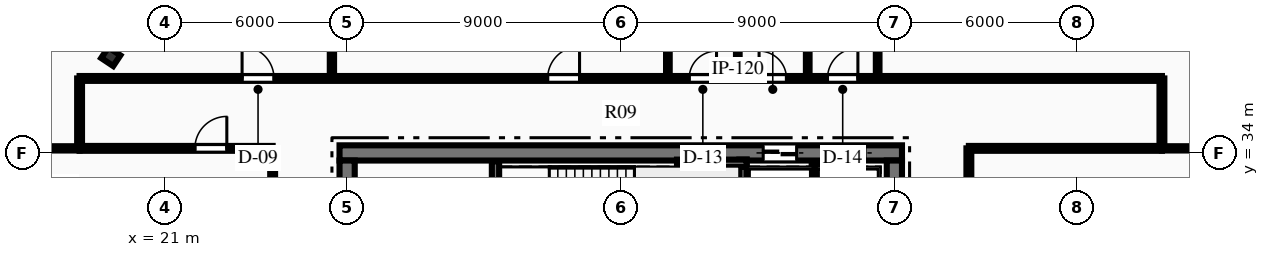
"""IFC4 building model, lengths in metres.
Left out: names, types, materials, properties, quantities, classifications, styles, units other than length and angle.
Written with IfcOpenShell. Run it as: python <this file> out.ifc"""

import sys

from ifc_helpers import new_model, si_unit, direction, frame, frame_2d, origin, origin_2d, place, context, subcontext, project, spatial, rectangle, i_section, extrude, element, fill, save


model = new_model("IFC4")
c1 = context("Model", 3, precision=1e-05, world=origin(), true_north=direction((0.0, 1.0)))
c2 = subcontext(c1, "Body", "Model", "MODEL_VIEW")
j1 = project(units=[si_unit("LENGTHUNIT", "METRE"), si_unit("PLANEANGLEUNIT", "RADIAN")], contexts=[c1])
p1 = place(None, origin())
s1 = spatial("IfcSite", under=j1, at=p1, CompositionType="ELEMENT")
p2 = place(p1, origin())
s2 = spatial("IfcBuilding", under=s1, at=p2, CompositionType="ELEMENT")
p3 = place(p2, frame((0.0, 0.0, 220.95)))
s3 = spatial("IfcBuildingStorey", under=s2, at=p3, CompositionType="ELEMENT", Elevation=220.95)
p4 = place(p3, frame((26.75, 34.0, 0.0), z_axis=(0.0, 0.0, 1.0), x_axis=(1.0, 0.0, 0.0)))
e1 = element("IfcWall", 1, at=p4, inside=s3, PredefinedType="SHEAR", context=c2, shape_type="SweptSolid", body=[
    extrude(rectangle(XDim=18.5, YDim=0.5, at=frame_2d((9.25, 0.0))), origin(), (0.0, 0.0, 1.0), 3.75),
])
p5 = place(p4, frame((13.935, 0.0, 0.0)))
e2 = element("IfcOpeningElement", 2, at=p5, cuts=e1, PredefinedType="OPENING", context=c2, shape_type="SweptSolid", body=[
    extrude(rectangle(XDim=1.1, YDim=2.15, at=frame_2d((0.55, 1.075))), frame((0.0, 0.26, 0.0), z_axis=(0.0, -1.0, 0.0), x_axis=(1.0, 0.0, 0.0)), (0.0, 0.0, 1.0), 0.52),
])
p6 = place(p4, frame((16.185, 0.0, 0.0)))
e3 = element("IfcOpeningElement", 3, at=p6, cuts=e1, PredefinedType="OPENING", context=c2, shape_type="SweptSolid", body=[
    extrude(rectangle(XDim=1.1, YDim=2.15, at=frame_2d((0.55, 1.075))), frame((0.0, 0.26, 0.0), z_axis=(0.0, -1.0, 0.0), x_axis=(1.0, 0.0, 0.0)), (0.0, 0.0, 1.0), 0.52),
])
p7 = place(p3, frame((27.0, 18.25, 0.0), z_axis=(0.0, 0.0, 1.0), x_axis=(0.0, 1.0, 0.0)))
e4 = element("IfcWall", 4, at=p7, inside=s3, PredefinedType="SHEAR", context=c2, shape_type="SweptSolid", body=[
    extrude(rectangle(XDim=15.5, YDim=0.5, at=frame_2d((7.75, 0.0))), origin(), (0.0, 0.0, 1.0), 3.75),
])
p8 = place(p7, frame((9.99, 0.0, 0.0)))
e5 = element("IfcOpeningElement", 5, at=p8, cuts=e4, PredefinedType="OPENING", context=c2, shape_type="SweptSolid", body=[
    extrude(rectangle(XDim=1.4, YDim=2.2, at=frame_2d((0.7, 1.1))), frame((0.0, 0.26, 0.0), z_axis=(0.0, -1.0, 0.0), x_axis=(1.0, 0.0, 0.0)), (0.0, 0.0, 1.0), 0.52),
])
p9 = place(p3, frame((45.0, 18.25, 0.0), z_axis=(0.0, 0.0, 1.0), x_axis=(0.0, 1.0, 0.0)))
e6 = element("IfcWall", 6, at=p9, inside=s3, PredefinedType="SHEAR", context=c2, shape_type="SweptSolid", body=[
    extrude(rectangle(XDim=15.5, YDim=0.5, at=frame_2d((7.75, 0.0))), origin(), (0.0, 0.0, 1.0), 3.75),
])
p10 = place(p9, frame((9.99, 0.0, 0.0)))
e7 = element("IfcOpeningElement", 7, at=p10, cuts=e6, PredefinedType="OPENING", context=c2, shape_type="SweptSolid", body=[
    extrude(rectangle(XDim=1.4, YDim=2.2, at=frame_2d((0.7, 1.1))), frame((0.0, 0.26, 0.0), z_axis=(0.0, -1.0, 0.0), x_axis=(1.0, 0.0, 0.0)), (0.0, 0.0, 1.0), 0.52),
])
p11 = place(p3, frame((31.88, 29.93, 0.0), z_axis=(0.0, 0.0, 1.0), x_axis=(0.0, 1.0, 0.0)))
e8 = element("IfcWall", 8, at=p11, inside=s3, PredefinedType="SHEAR", context=c2, shape_type="SweptSolid", body=[
    extrude(rectangle(XDim=3.79, YDim=0.24, at=frame_2d((1.895, 0.0))), origin(), (0.0, 0.0, 1.0), 3.75),
])
p12 = place(p3, frame((40.02, 29.93, 0.0), z_axis=(0.0, 0.0, 1.0), x_axis=(0.0, 1.0, 0.0)))
e9 = element("IfcWall", 9, at=p12, inside=s3, PredefinedType="SHEAR", context=c2, shape_type="SweptSolid", body=[
    extrude(rectangle(XDim=3.85, YDim=0.24, at=frame_2d((1.925, 0.0))), origin(), (0.0, 0.0, 1.0), 3.75),
])
p13 = place(p3, frame((37.85, 33.66, 0.0), z_axis=(0.0, 0.0, 1.0), x_axis=(1.0, 0.0, 0.0)))
e10 = element("IfcWall", 10, at=p13, inside=s3, PredefinedType="SHEAR", context=c2, shape_type="SweptSolid", body=[
    extrude(rectangle(XDim=2.29, YDim=0.24, at=frame_2d((1.145, 0.0))), origin(), (0.0, 0.0, 1.0), 3.75),
])
p14 = place(p3, frame((19.226, 37.166, 0.0), z_axis=(0.0, 0.0, 1.0), x_axis=(0.554118199338, 0.832437998389, 0.0)))
e11 = element("IfcColumn", 11, at=p14, inside=s3, PredefinedType="COLUMN", context=c2, shape_type="SweptSolid", body=[
    extrude(i_section(OverallWidth=0.424, OverallDepth=0.474, WebThickness=0.048, FlangeThickness=0.077, at=origin_2d()), origin(), (0.0, 0.0, 1.0), 3.75),
])
p15 = place(p3, frame((42.37, 29.9, 0.0), z_axis=(0.0, 0.0, 1.0), x_axis=(0.0, 1.0, 0.0)))
e12 = element("IfcWall", 12, at=p15, inside=s3, PredefinedType="PARTITIONING", context=c2, shape_type="SweptSolid", body=[
    extrude(rectangle(XDim=3.75, YDim=0.18, at=frame_2d((1.875, 0.0))), origin(), (0.0, 0.0, 1.0), 3.47),
])
p16 = place(p3, frame((18.2, 36.45, 0.0), z_axis=(0.0, 0.0, 1.0), x_axis=(1.0, 0.0, 0.0)))
e13 = element("IfcWall", 13, at=p16, inside=s3, PredefinedType="PARTITIONING", context=c2, shape_type="SweptSolid", body=[
    extrude(rectangle(XDim=35.6, YDim=0.16, at=frame_2d((17.8, 0.0))), origin(), (0.0, 0.0, 1.0), 2.849),
])
p17 = place(p16, frame((20.05, 0.0, 0.0)))
e14 = element("IfcOpeningElement", 14, at=p17, cuts=e13, PredefinedType="OPENING", context=c2, shape_type="SweptSolid", body=[
    extrude(rectangle(XDim=0.9, YDim=2.15, at=frame_2d((0.45, 1.075))), frame((0.0, 0.09, 0.0), z_axis=(0.0, -1.0, 0.0), x_axis=(1.0, 0.0, 0.0)), (0.0, 0.0, 1.0), 0.18),
])
p18 = place(p16, frame((22.35, 0.0, 0.0)))
e15 = element("IfcOpeningElement", 15, at=p18, cuts=e13, PredefinedType="OPENING", context=c2, shape_type="SweptSolid", body=[
    extrude(rectangle(XDim=0.9, YDim=2.15, at=frame_2d((0.45, 1.075))), frame((0.0, 0.09, 0.0), z_axis=(0.0, -1.0, 0.0), x_axis=(1.0, 0.0, 0.0)), (0.0, 0.0, 1.0), 0.18),
])
p19 = place(p16, frame((24.6, 0.0, 0.0)))
e16 = element("IfcOpeningElement", 16, at=p19, cuts=e13, PredefinedType="OPENING", context=c2, shape_type="SweptSolid", body=[
    extrude(rectangle(XDim=1.0, YDim=2.15, at=frame_2d((0.5, 1.075))), frame((0.0, 0.09, 0.0), z_axis=(0.0, -1.0, 0.0), x_axis=(1.0, 0.0, 0.0)), (0.0, 0.0, 1.0), 0.18),
])
p20 = place(p16, frame((5.345, 0.0, 0.0)))
e17 = element("IfcOpeningElement", 17, at=p20, cuts=e13, PredefinedType="OPENING", context=c2, shape_type="SweptSolid", body=[
    extrude(rectangle(XDim=1.05, YDim=2.15, at=frame_2d((0.525, 1.075))), frame((0.0, 0.09, 0.0), z_axis=(0.0, -1.0, 0.0), x_axis=(1.0, 0.0, 0.0)), (0.0, 0.0, 1.0), 0.18),
])
p21 = place(p16, frame((15.395, 0.0, 0.0)))
e18 = element("IfcOpeningElement", 18, at=p21, cuts=e13, PredefinedType="OPENING", context=c2, shape_type="SweptSolid", body=[
    extrude(rectangle(XDim=1.05, YDim=2.15, at=frame_2d((0.525, 1.075))), frame((0.0, 0.09, 0.0), z_axis=(0.0, -1.0, 0.0), x_axis=(1.0, 0.0, 0.0)), (0.0, 0.0, 1.0), 0.18),
])
p22 = place(p3, frame((18.2, 34.15, 0.0), z_axis=(0.0, 0.0, 1.0), x_axis=(1.0, 0.0, 0.0)))
e19 = element("IfcWall", 19, at=p22, inside=s3, PredefinedType="PARTITIONING", context=c2, shape_type="SweptSolid", body=[
    extrude(rectangle(XDim=6.35, YDim=0.16, at=frame_2d((3.175, 0.0))), origin(), (0.0, 0.0, 1.0), 3.47),
])
p23 = place(p22, frame((3.793, 0.0, 0.0)))
e20 = element("IfcOpeningElement", 20, at=p23, cuts=e19, PredefinedType="OPENING", context=c2, shape_type="SweptSolid", body=[
    extrude(rectangle(XDim=1.05, YDim=2.15, at=frame_2d((0.525, 1.075))), frame((0.0, 0.09, 0.0), z_axis=(0.0, -1.0, 0.0), x_axis=(1.0, 0.0, 0.0)), (0.0, 0.0, 1.0), 0.18),
])
p24 = place(p3, frame((47.45, 34.15, 0.0), z_axis=(0.0, 0.0, 1.0), x_axis=(1.0, 0.0, 0.0)))
e21 = element("IfcWall", 21, at=p24, inside=s3, PredefinedType="PARTITIONING", context=c2, shape_type="SweptSolid", body=[
    extrude(rectangle(XDim=6.35, YDim=0.16, at=frame_2d((3.175, 0.0))), origin(), (0.0, 0.0, 1.0), 3.47),
])
p25 = place(p3, frame((24.55, 17.85, 0.0), z_axis=(0.0, 0.0, 1.0), x_axis=(0.0, 1.0, 0.0)))
e22 = element("IfcWall", 22, at=p25, inside=s3, PredefinedType="PARTITIONING", context=c2, shape_type="SweptSolid", body=[
    extrude(rectangle(XDim=16.3, YDim=0.16, at=frame_2d((8.15, 0.0))), origin(), (0.0, 0.0, 1.0), 3.47),
])
p26 = place(p25, frame((5.775, 0.0, 0.0)))
e23 = element("IfcOpeningElement", 23, at=p26, cuts=e22, PredefinedType="OPENING", context=c2, shape_type="SweptSolid", body=[
    extrude(rectangle(XDim=1.05, YDim=2.15, at=frame_2d((0.525, 1.075))), frame((0.0, 0.09, 0.0), z_axis=(0.0, -1.0, 0.0), x_axis=(1.0, 0.0, 0.0)), (0.0, 0.0, 1.0), 0.18),
])
p27 = place(p25, frame((9.777, 0.0, 0.0)))
e24 = element("IfcOpeningElement", 24, at=p27, cuts=e22, PredefinedType="OPENING", context=c2, shape_type="SweptSolid", body=[
    extrude(rectangle(XDim=1.05, YDim=2.15, at=frame_2d((0.525, 1.075))), frame((0.0, 0.09, 0.0), z_axis=(0.0, -1.0, 0.0), x_axis=(1.0, 0.0, 0.0)), (0.0, 0.0, 1.0), 0.18),
])
p28 = place(p3, frame((47.45, 27.25, 0.0), z_axis=(0.0, 0.0, 1.0), x_axis=(0.0, 1.0, 0.0)))
e25 = element("IfcWall", 25, at=p28, inside=s3, PredefinedType="PARTITIONING", context=c2, shape_type="SweptSolid", body=[
    extrude(rectangle(XDim=6.9, YDim=0.16, at=frame_2d((3.45, 0.0))), origin(), (0.0, 0.0, 1.0), 3.47),
])
p29 = place(p28, frame((1.683, 0.0, 0.0)))
e26 = element("IfcOpeningElement", 26, at=p29, cuts=e25, PredefinedType="OPENING", context=c2, shape_type="SweptSolid", body=[
    extrude(rectangle(XDim=1.05, YDim=2.15, at=frame_2d((0.525, 1.075))), frame((0.0, 0.09, 0.0), z_axis=(0.0, -1.0, 0.0), x_axis=(1.0, 0.0, 0.0)), (0.0, 0.0, 1.0), 0.18),
])
for number, where, z_axis, x_axis in (
    (27, (18.2, 34.15, 0.0), (0.0, 0.0, 1.0), (0.0, 1.0, 0.0)),
    (28, (53.8, 34.15, 0.0), (0.0, 0.0, 1.0), (0.0, 1.0, 0.0)),
):
    element("IfcWall", number, at=place(p3, frame(where, z_axis=z_axis, x_axis=x_axis)), inside=s3, PredefinedType="PARTITIONING", context=c2, shape_type="SweptSolid", body=[
        extrude(rectangle(XDim=2.3, YDim=0.16, at=frame_2d((1.15, 0.0))), origin(), (0.0, 0.0, 1.0), 3.47),
    ])
for number, where, z_axis, x_axis in (
    (29, (37.55, 36.45, 0.0), (0.0, 0.0, 1.0), (0.0, 1.0, 0.0)),
    (30, (39.85, 36.45, 0.0), (0.0, 0.0, 1.0), (0.0, 1.0, 0.0)),
    (31, (42.15, 36.45, 0.0), (0.0, 0.0, 1.0), (0.0, 1.0, 0.0)),
    (32, (44.45, 36.45, 0.0), (0.0, 0.0, 1.0), (0.0, 1.0, 0.0)),
):
    element("IfcWall", number, at=place(p3, frame(where, z_axis=z_axis, x_axis=x_axis)), inside=s3, PredefinedType="PARTITIONING", context=c2, shape_type="SweptSolid", body=[
        extrude(rectangle(XDim=3.9, YDim=0.12, at=frame_2d((1.95, 0.0))), origin(), (0.0, 0.0, 1.0), 3.47),
    ])
p30 = place(p3, frame((14.74, 34.15, 0.0), z_axis=(0.0, 0.0, 1.0), x_axis=(1.0, 0.0, 0.0)))
e33 = element("IfcWall", 33, at=p30, inside=s3, PredefinedType="PARTITIONING", context=c2, shape_type="SweptSolid", body=[
    extrude(rectangle(XDim=3.46, YDim=0.14, at=frame_2d((1.73, 0.0))), origin(), (0.0, 0.0, 1.0), 3.47),
])
p31 = place(p3, frame((53.8, 34.15, 0.0), z_axis=(0.0, 0.0, 1.0), x_axis=(1.0, 0.0, 0.0)))
e34 = element("IfcWall", 34, at=p31, inside=s3, PredefinedType="PARTITIONING", context=c2, shape_type="SweptSolid", body=[
    extrude(rectangle(XDim=10.377, YDim=0.14, at=frame_2d((5.188, 0.0))), origin(), (0.0, 0.0, 1.0), 3.47),
])
p32 = place(p3, frame((26.5, 36.45, 0.0), z_axis=(0.0, 0.0, 1.0), x_axis=(0.0, 1.0, 0.0)))
e35 = element("IfcWall", 35, at=p32, inside=s3, PredefinedType="PARTITIONING", context=c2, shape_type="SweptSolid", body=[
    extrude(rectangle(XDim=16.16, YDim=0.14, at=frame_2d((8.08, 0.0))), origin(), (0.0, 0.0, 1.0), 3.008),
])
p33 = place(p17, origin())
e36 = element("IfcDoor", 36, at=p33, inside=s3, OperationType="SINGLE_SWING_RIGHT", PredefinedType="DOOR", context=c2, shape_type="SweptSolid", body=[
    extrude(rectangle(XDim=0.9, YDim=2.15, at=frame_2d((0.45, 1.075))), frame((0.0, 0.025, 0.0), z_axis=(0.0, -1.0, 0.0), x_axis=(1.0, 0.0, 0.0)), (0.0, 0.0, 1.0), 0.05),
])
fill(e14, e36)
p34 = place(p18, origin())
e37 = element("IfcDoor", 37, at=p34, inside=s3, OperationType="SINGLE_SWING_LEFT", PredefinedType="DOOR", context=c2, shape_type="SweptSolid", body=[
    extrude(rectangle(XDim=0.9, YDim=2.15, at=frame_2d((0.45, 1.075))), frame((0.0, 0.025, 0.0), z_axis=(0.0, -1.0, 0.0), x_axis=(1.0, 0.0, 0.0)), (0.0, 0.0, 1.0), 0.05),
])
fill(e15, e37)
p35 = place(p19, origin())
e38 = element("IfcDoor", 38, at=p35, inside=s3, OperationType="SINGLE_SWING_RIGHT", PredefinedType="DOOR", context=c2, shape_type="SweptSolid", body=[
    extrude(rectangle(XDim=1.0, YDim=2.15, at=frame_2d((0.5, 1.075))), frame((0.0, 0.025, 0.0), z_axis=(0.0, -1.0, 0.0), x_axis=(1.0, 0.0, 0.0)), (0.0, 0.0, 1.0), 0.05),
])
fill(e16, e38)
p36 = place(p20, origin())
e39 = element("IfcDoor", 39, at=p36, inside=s3, OperationType="SINGLE_SWING_LEFT", PredefinedType="DOOR", context=c2, shape_type="SweptSolid", body=[
    extrude(rectangle(XDim=1.05, YDim=2.15, at=frame_2d((0.525, 1.075))), frame((0.0, 0.025, 0.0), z_axis=(0.0, -1.0, 0.0), x_axis=(1.0, 0.0, 0.0)), (0.0, 0.0, 1.0), 0.05),
])
fill(e17, e39)
p37 = place(p21, origin())
e40 = element("IfcDoor", 40, at=p37, inside=s3, OperationType="SINGLE_SWING_RIGHT", PredefinedType="DOOR", context=c2, shape_type="SweptSolid", body=[
    extrude(rectangle(XDim=1.05, YDim=2.15, at=frame_2d((0.525, 1.075))), frame((0.0, 0.025, 0.0), z_axis=(0.0, -1.0, 0.0), x_axis=(1.0, 0.0, 0.0)), (0.0, 0.0, 1.0), 0.05),
])
fill(e18, e40)
p38 = place(p23, origin())
e41 = element("IfcDoor", 41, at=p38, inside=s3, OperationType="SINGLE_SWING_RIGHT", PredefinedType="DOOR", context=c2, shape_type="SweptSolid", body=[
    extrude(rectangle(XDim=1.05, YDim=2.15, at=frame_2d((0.525, 1.075))), frame((0.0, 0.025, 0.0), z_axis=(0.0, -1.0, 0.0), x_axis=(1.0, 0.0, 0.0)), (0.0, 0.0, 1.0), 0.05),
])
fill(e20, e41)
p39 = place(p5, origin())
e42 = element("IfcDoor", 42, at=p39, inside=s3, OperationType="SLIDING_TO_LEFT", PredefinedType="DOOR", context=c2, shape_type="SweptSolid", body=[
    extrude(rectangle(XDim=1.1, YDim=2.15, at=frame_2d((0.55, 1.075))), frame((0.0, 0.025, 0.0), z_axis=(0.0, -1.0, 0.0), x_axis=(1.0, 0.0, 0.0)), (0.0, 0.0, 1.0), 0.05),
])
fill(e2, e42)
p40 = place(p6, origin())
e43 = element("IfcDoor", 43, at=p40, inside=s3, OperationType="SLIDING_TO_LEFT", PredefinedType="DOOR", context=c2, shape_type="SweptSolid", body=[
    extrude(rectangle(XDim=1.1, YDim=2.15, at=frame_2d((0.55, 1.075))), frame((0.0, 0.025, 0.0), z_axis=(0.0, -1.0, 0.0), x_axis=(1.0, 0.0, 0.0)), (0.0, 0.0, 1.0), 0.05),
])
fill(e3, e43)
save(model, sys.argv[1])
